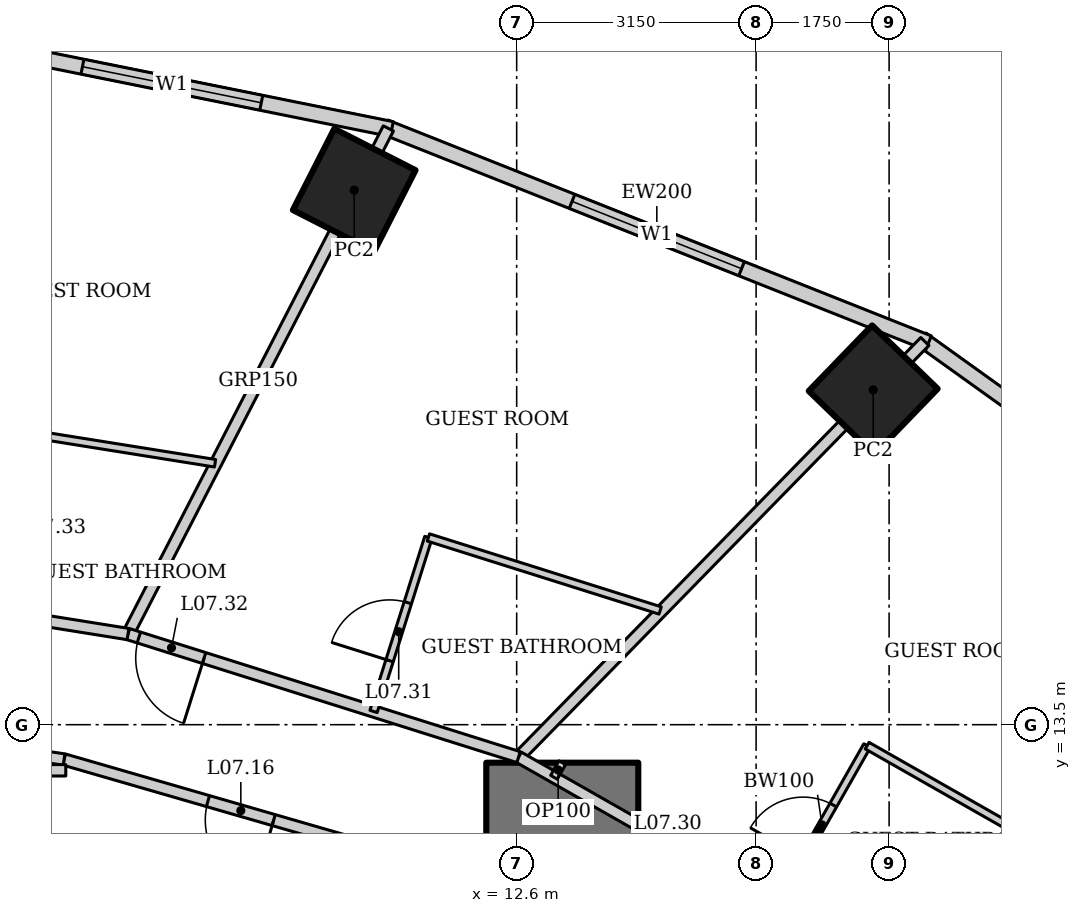
"""IFC4 building model, lengths in metres.
Left out: names, types, materials, properties, quantities, classifications, styles, units other than length and angle.
Written with IfcOpenShell. Run it as: python <this file> out.ifc"""

import sys

from ifc_helpers import new_model, si_unit, direction, frame, frame_2d, origin, origin_2d, place, context, subcontext, project, spatial, rectangle, hollow_rectangle, extrude, element, fill, save


model = new_model("IFC4")
c1 = context("Model", 3, precision=1e-05, world=origin(), true_north=direction((0.0, 1.0)))
c2 = subcontext(c1, "Body", "Model", "MODEL_VIEW")
j1 = project(units=[si_unit("LENGTHUNIT", "METRE"), si_unit("PLANEANGLEUNIT", "RADIAN")], contexts=[c1])
p1 = place(None, origin())
s1 = spatial("IfcSite", under=j1, at=p1, CompositionType="ELEMENT")
p2 = place(p1, origin())
s2 = spatial("IfcBuilding", under=s1, at=p2, CompositionType="ELEMENT")
p3 = place(p2, frame((0.0, 0.0, 40.6)))
s3 = spatial("IfcBuildingStorey", under=s2, at=p3, CompositionType="ELEMENT", Elevation=40.6)
for number, where, z_axis, x_axis in (
    (1, (17.291, 17.905, 0.0), (0.0, 0.0, 1.0), (0.695, 0.719, 0.0)),
    (2, (10.463, 20.534, 0.0), (0.0, 0.0, 1.0), (0.454, 0.891, 0.0)),
):
    element("IfcColumn", number, at=place(p3, frame(where, z_axis=z_axis, x_axis=x_axis)), inside=s3, PredefinedType="COLUMN", context=c2, shape_type="SweptSolid", body=[
        extrude(hollow_rectangle(XDim=1.2, YDim=1.2, WallThickness=0.1, at=origin_2d()), origin(), (0.0, 0.0, 1.0), 3.6),
    ])
p4 = place(p3, frame((13.2, -13.0, 0.0), z_axis=(0.0, 0.0, 1.0), x_axis=(0.0, 1.0, 0.0)))
e3 = element("IfcWall", 3, at=p4, inside=s3, PredefinedType="SHEAR", context=c2, shape_type="SweptSolid", body=[
    extrude(rectangle(XDim=26.0, YDim=2.0, at=frame_2d((13.0, 0.0))), origin(), (0.0, 0.0, 1.0), 3.6),
])
p5 = place(p4, frame((12.1, 0.0, 0.0)))
e4 = element("IfcOpeningElement", 4, at=p5, cuts=e3, PredefinedType="OPENING", context=c2, shape_type="SweptSolid", body=[
    extrude(rectangle(XDim=1.8, YDim=2.1, at=frame_2d((0.9, 1.05))), frame((0.0, 1.01, 0.0), z_axis=(0.0, -1.0, 0.0), x_axis=(1.0, 0.0, 0.0)), (0.0, 0.0, 1.0), 2.02),
])
p6 = place(p3, frame((24.482, 13.875, 0.0), z_axis=(0.0, 0.0, 1.0), x_axis=(-0.812791321576, 0.582554948112, 0.0)))
e5 = element("IfcWall", 5, at=p6, inside=s3, PredefinedType="SOLIDWALL", context=c2, shape_type="SweptSolid", body=[
    extrude(rectangle(XDim=8.063, YDim=0.2, at=frame_2d((4.032, 0.0))), origin(), (0.0, 0.0, 1.0), 3.45),
])
p7 = place(p6, frame((2.832, 0.0, 0.5)))
e6 = element("IfcOpeningElement", 6, at=p7, cuts=e5, PredefinedType="OPENING", context=c2, shape_type="SweptSolid", body=[
    extrude(rectangle(XDim=2.4, YDim=2.2, at=frame_2d((1.2, 1.1))), frame((0.0, 0.11, 0.0), z_axis=(0.0, -1.0, 0.0), x_axis=(1.0, 0.0, 0.0)), (0.0, 0.0, 1.0), 0.22),
])
p8 = place(p3, frame((18.018, 18.523, 0.0), z_axis=(0.0, 0.0, 1.0), x_axis=(-0.929358351251, 0.369178892895, 0.0)))
e7 = element("IfcWall", 7, at=p8, inside=s3, PredefinedType="SOLIDWALL", context=c2, shape_type="SweptSolid", body=[
    extrude(rectangle(XDim=7.692, YDim=0.2, at=frame_2d((3.846, 0.0))), origin(), (0.0, 0.0, 1.0), 3.45),
])
p9 = place(p8, frame((2.646, 0.0, 0.5)))
e8 = element("IfcOpeningElement", 8, at=p9, cuts=e7, PredefinedType="OPENING", context=c2, shape_type="SweptSolid", body=[
    extrude(rectangle(XDim=2.4, YDim=2.2, at=frame_2d((1.2, 1.1))), frame((0.0, 0.11, 0.0), z_axis=(0.0, -1.0, 0.0), x_axis=(1.0, 0.0, 0.0)), (0.0, 0.0, 1.0), 0.22),
])
p10 = place(p3, frame((10.957, 21.337, 0.0), z_axis=(0.0, 0.0, 1.0), x_axis=(-0.980251657452, 0.197754110105, 0.0)))
e9 = element("IfcWall", 9, at=p10, inside=s3, PredefinedType="SOLIDWALL", context=c2, shape_type="SweptSolid", body=[
    extrude(rectangle(XDim=5.904, YDim=0.2, at=frame_2d((2.952, 0.0))), origin(), (0.0, 0.0, 1.0), 3.45),
])
p11 = place(p10, frame((1.752, 0.0, 0.5)))
e10 = element("IfcOpeningElement", 10, at=p11, cuts=e9, PredefinedType="OPENING", context=c2, shape_type="SweptSolid", body=[
    extrude(rectangle(XDim=2.4, YDim=2.2, at=frame_2d((1.2, 1.1))), frame((0.0, 0.11, 0.0), z_axis=(0.0, -1.0, 0.0), x_axis=(1.0, 0.0, 0.0)), (0.0, 0.0, 1.0), 0.22),
])
p12 = place(p3, frame((24.435, 13.909, 0.0), z_axis=(0.0, 0.0, 1.0), x_axis=(-0.871267209855, -0.490808974074, 0.0)))
e11 = element("IfcWall", 11, at=p12, inside=s3, PredefinedType="PARTITIONING", context=c2, shape_type="SweptSolid", body=[
    extrude(rectangle(XDim=7.659, YDim=0.15, at=frame_2d((3.83, 0.0))), origin(), (0.0, 0.0, 1.0), 2.693),
])
p13 = place(p3, frame((17.97, 18.542, 0.0), z_axis=(0.0, 0.0, 1.0), x_axis=(-0.699032031211, -0.715090357467, 0.0)))
e12 = element("IfcWall", 12, at=p13, inside=s3, PredefinedType="PARTITIONING", context=c2, shape_type="SweptSolid", body=[
    extrude(rectangle(XDim=7.647, YDim=0.15, at=frame_2d((3.824, 0.0))), origin(), (0.0, 0.0, 1.0), 2.528),
])
p14 = place(p3, frame((10.912, 21.346, 0.0), z_axis=(0.0, 0.0, 1.0), x_axis=(-0.45777845119, -0.889066302154, 0.0)))
e13 = element("IfcWall", 13, at=p14, inside=s3, PredefinedType="PARTITIONING", context=c2, shape_type="SweptSolid", body=[
    extrude(rectangle(XDim=7.483, YDim=0.15, at=frame_2d((3.742, 0.0))), origin(), (0.0, 0.0, 1.0), 2.528),
])
p15 = place(p3, frame((17.761, 10.149, 0.0), z_axis=(0.0, 0.0, 1.0), x_axis=(-0.86907565943, 0.494679187136, 0.0)))
e14 = element("IfcWall", 14, at=p15, inside=s3, PredefinedType="PARTITIONING", context=c2, shape_type="SweptSolid", body=[
    extrude(rectangle(XDim=5.911, YDim=0.15, at=frame_2d((2.955, 0.0))), origin(), (0.0, 0.0, 1.0), 3.45),
])
p16 = place(p15, frame((2.55, 0.0, 0.0)))
e15 = element("IfcOpeningElement", 15, at=p16, cuts=e14, PredefinedType="OPENING", context=c2, shape_type="SweptSolid", body=[
    extrude(rectangle(XDim=0.9, YDim=2.1, at=frame_2d((0.45, 1.05))), frame((0.0, 0.085, 0.0), z_axis=(0.0, -1.0, 0.0), x_axis=(1.0, 0.0, 0.0)), (0.0, 0.0, 1.0), 0.17),
])
p17 = place(p3, frame((12.625, 13.073, 0.0), z_axis=(0.0, 0.0, 1.0), x_axis=(-0.953774229808, 0.30052407317, 0.0)))
e16 = element("IfcWall", 16, at=p17, inside=s3, PredefinedType="PARTITIONING", context=c2, shape_type="SweptSolid", body=[
    extrude(rectangle(XDim=5.388, YDim=0.15, at=frame_2d((2.694, 0.0))), origin(), (0.0, 0.0, 1.0), 3.45),
])
p18 = place(p17, frame((4.338, 0.0, 0.0)))
e17 = element("IfcOpeningElement", 17, at=p18, cuts=e16, PredefinedType="OPENING", context=c2, shape_type="SweptSolid", body=[
    extrude(rectangle(XDim=0.9, YDim=2.1, at=frame_2d((0.45, 1.05))), frame((0.0, 0.085, 0.0), z_axis=(0.0, -1.0, 0.0), x_axis=(1.0, 0.0, 0.0)), (0.0, 0.0, 1.0), 0.17),
])
p19 = place(p3, frame((7.486, 14.692, 0.0), z_axis=(0.0, 0.0, 1.0), x_axis=(-0.987475660646, 0.157771415761, 0.0)))
e18 = element("IfcWall", 18, at=p19, inside=s3, PredefinedType="PARTITIONING", context=c2, shape_type="SweptSolid", body=[
    extrude(rectangle(XDim=3.999, YDim=0.15, at=frame_2d((1.999, 0.0))), origin(), (0.0, 0.0, 1.0), 3.45),
])
p20 = place(p19, frame((2.1, 0.0, 0.0)))
e19 = element("IfcOpeningElement", 19, at=p20, cuts=e18, PredefinedType="OPENING", context=c2, shape_type="SweptSolid", body=[
    extrude(rectangle(XDim=0.9, YDim=2.1, at=frame_2d((0.45, 1.05))), frame((0.0, 0.085, 0.0), z_axis=(0.0, -1.0, 0.0), x_axis=(1.0, 0.0, 0.0)), (0.0, 0.0, 1.0), 0.17),
])
p21 = place(p3, frame((11.296, 11.698, 0.0), z_axis=(0.0, 0.0, 1.0), x_axis=(-0.960678318068, 0.277663770041, 0.0)))
e20 = element("IfcWall", 20, at=p21, inside=s3, PredefinedType="PARTITIONING", context=c2, shape_type="SweptSolid", body=[
    extrude(rectangle(XDim=4.841, YDim=0.15, at=frame_2d((2.421, 0.0))), origin(), (0.0, 0.0, 1.0), 3.45),
])
p22 = place(p21, frame((1.971, 0.0, 0.0)))
e21 = element("IfcOpeningElement", 21, at=p22, cuts=e20, PredefinedType="OPENING", context=c2, shape_type="SweptSolid", body=[
    extrude(rectangle(XDim=0.9, YDim=2.1, at=frame_2d((0.45, 1.05))), frame((0.0, 0.085, 0.0), z_axis=(0.0, -1.0, 0.0), x_axis=(1.0, 0.0, 0.0)), (0.0, 0.0, 1.0), 0.17),
])
p23 = place(p3, frame((6.645, 13.042, 0.0), z_axis=(0.0, 0.0, 1.0), x_axis=(-0.989443047021, 0.14492224364, 0.0)))
e22 = element("IfcWall", 22, at=p23, inside=s3, PredefinedType="PARTITIONING", context=c2, shape_type="SweptSolid", body=[
    extrude(rectangle(XDim=3.553, YDim=0.15, at=frame_2d((1.776, 0.0))), origin(), (0.0, 0.0, 1.0), 3.45),
])
p24 = place(p3, frame((16.023, 11.139, 0.0), z_axis=(0.0, 0.0, 1.0), x_axis=(0.494659381266, 0.869086932663, 0.0)))
e23 = element("IfcWall", 23, at=p24, inside=s3, PredefinedType="PARTITIONING", context=c2, shape_type="SweptSolid", body=[
    extrude(rectangle(XDim=2.4, YDim=0.1, at=frame_2d((1.2, 0.0))), origin(), (0.0, 0.0, 1.0), 3.45),
])
p25 = place(p24, frame((0.7, 0.0, 0.0)))
e24 = element("IfcOpeningElement", 24, at=p25, cuts=e23, PredefinedType="OPENING", context=c2, shape_type="SweptSolid", body=[
    extrude(rectangle(XDim=0.8, YDim=2.1, at=frame_2d((0.4, 1.05))), frame((0.0, 0.06, 0.0), z_axis=(0.0, -1.0, 0.0), x_axis=(1.0, 0.0, 0.0)), (0.0, 0.0, 1.0), 0.12),
])
p26 = place(p3, frame((17.21, 13.225, 0.0), z_axis=(0.0, 0.0, 1.0), x_axis=(0.869041592831, -0.494739032147, 0.0)))
e25 = element("IfcWall", 25, at=p26, inside=s3, PredefinedType="PARTITIONING", context=c2, shape_type="SweptSolid", body=[
    extrude(rectangle(XDim=3.42, YDim=0.1, at=frame_2d((1.71, 0.0))), origin(), (0.0, 0.0, 1.0), 3.45),
])
p27 = place(p3, frame((10.717, 13.674, 0.0), z_axis=(0.0, 0.0, 1.0), x_axis=(0.30049839721, 0.953782319649, 0.0)))
e26 = element("IfcWall", 26, at=p27, inside=s3, PredefinedType="PARTITIONING", context=c2, shape_type="SweptSolid", body=[
    extrude(rectangle(XDim=2.4, YDim=0.1, at=frame_2d((1.2, 0.0))), origin(), (0.0, 0.0, 1.0), 3.45),
])
p28 = place(p27, frame((0.7, 0.0, 0.0)))
e27 = element("IfcOpeningElement", 27, at=p28, cuts=e26, PredefinedType="OPENING", context=c2, shape_type="SweptSolid", body=[
    extrude(rectangle(XDim=0.8, YDim=2.1, at=frame_2d((0.4, 1.05))), frame((0.0, 0.06, 0.0), z_axis=(0.0, -1.0, 0.0), x_axis=(1.0, 0.0, 0.0)), (0.0, 0.0, 1.0), 0.12),
])
p29 = place(p3, frame((11.438, 15.963, 0.0), z_axis=(0.0, 0.0, 1.0), x_axis=(0.953784420519, -0.300491728963, 0.0)))
e28 = element("IfcWall", 28, at=p29, inside=s3, PredefinedType="PARTITIONING", context=c2, shape_type="SweptSolid", body=[
    extrude(rectangle(XDim=3.197, YDim=0.1, at=frame_2d((1.599, 0.0))), origin(), (0.0, 0.0, 1.0), 3.45),
])
p30 = place(p3, frame((5.89, 17.378, 0.0), z_axis=(0.0, 0.0, 1.0), x_axis=(0.987476824576, -0.15776413067, 0.0)))
e29 = element("IfcWall", 29, at=p30, inside=s3, PredefinedType="PARTITIONING", context=c2, shape_type="SweptSolid", body=[
    extrude(rectangle(XDim=2.776, YDim=0.1, at=frame_2d((1.388, 0.0))), origin(), (0.0, 0.0, 1.0), 3.45),
])
p31 = place(p3, frame((13.2, 13.0, 0.0), z_axis=(0.0, 0.0, 1.0), x_axis=(-0.49435138335, -0.869262164011, 0.0)))
e30 = element("IfcWall", 30, at=p31, inside=s3, PredefinedType="PARTITIONING", context=c2, shape_type="SweptSolid", body=[
    extrude(rectangle(XDim=0.221, YDim=0.1, at=frame_2d((0.11, 0.0))), origin(), (0.0, 0.0, 1.0), 3.45),
])
p32 = place(p3, frame((6.668, 12.9, 0.0), z_axis=(0.0, 0.0, 1.0), x_axis=(-1.0, 0.0, 0.0)))
e31 = element("IfcWall", 31, at=p32, inside=s3, PredefinedType="PARTITIONING", context=c2, shape_type="SweptSolid", body=[
    extrude(rectangle(XDim=4.633, YDim=0.15, at=frame_2d((2.316, 0.0))), origin(), (0.0, 0.0, 1.0), 3.45),
])
p33 = place(p9, origin())
e32 = element("IfcWindow", 32, at=p33, inside=s3, PartitioningType="SINGLE_PANEL", PredefinedType="WINDOW", context=c2, shape_type="SweptSolid", body=[
    extrude(rectangle(XDim=2.4, YDim=2.2, at=frame_2d((1.2, 1.1))), frame((0.0, 0.03, 0.0), z_axis=(0.0, -1.0, 0.0), x_axis=(1.0, 0.0, 0.0)), (0.0, 0.0, 1.0), 0.06),
])
fill(e8, e32)
p34 = place(p11, origin())
e33 = element("IfcWindow", 33, at=p34, inside=s3, PartitioningType="SINGLE_PANEL", PredefinedType="WINDOW", context=c2, shape_type="SweptSolid", body=[
    extrude(rectangle(XDim=2.4, YDim=2.2, at=frame_2d((1.2, 1.1))), frame((0.0, 0.03, 0.0), z_axis=(0.0, -1.0, 0.0), x_axis=(1.0, 0.0, 0.0)), (0.0, 0.0, 1.0), 0.06),
])
fill(e10, e33)
p35 = place(p22, origin())
e34 = element("IfcDoor", 34, at=p35, inside=s3, OperationType="SINGLE_SWING_LEFT", PredefinedType="DOOR", context=c2, shape_type="SweptSolid", body=[
    extrude(rectangle(XDim=0.9, YDim=2.1, at=frame_2d((0.45, 1.05))), frame((0.0, 0.025, 0.0), z_axis=(0.0, -1.0, 0.0), x_axis=(1.0, 0.0, 0.0)), (0.0, 0.0, 1.0), 0.05),
])
fill(e21, e34)
p36 = place(p25, origin())
e35 = element("IfcDoor", 35, at=p36, inside=s3, OperationType="SINGLE_SWING_LEFT", PredefinedType="DOOR", context=c2, shape_type="SweptSolid", body=[
    extrude(rectangle(XDim=0.8, YDim=2.1, at=frame_2d((0.4, 1.05))), frame((0.0, 0.025, 0.0), z_axis=(0.0, -1.0, 0.0), x_axis=(1.0, 0.0, 0.0)), (0.0, 0.0, 1.0), 0.05),
])
fill(e24, e35)
p37 = place(p28, origin())
e36 = element("IfcDoor", 36, at=p37, inside=s3, OperationType="SINGLE_SWING_LEFT", PredefinedType="DOOR", context=c2, shape_type="SweptSolid", body=[
    extrude(rectangle(XDim=0.8, YDim=2.1, at=frame_2d((0.4, 1.05))), frame((0.0, 0.025, 0.0), z_axis=(0.0, -1.0, 0.0), x_axis=(1.0, 0.0, 0.0)), (0.0, 0.0, 1.0), 0.05),
])
fill(e27, e36)
p38 = place(p18, origin())
e37 = element("IfcDoor", 37, at=p38, inside=s3, OperationType="SINGLE_SWING_LEFT", PredefinedType="DOOR", context=c2, shape_type="SweptSolid", body=[
    extrude(rectangle(XDim=0.9, YDim=2.1, at=frame_2d((0.45, 1.05))), frame((0.0, 0.025, 0.0), z_axis=(0.0, -1.0, 0.0), x_axis=(1.0, 0.0, 0.0)), (0.0, 0.0, 1.0), 0.05),
])
fill(e17, e37)
save(model, sys.argv[1])
